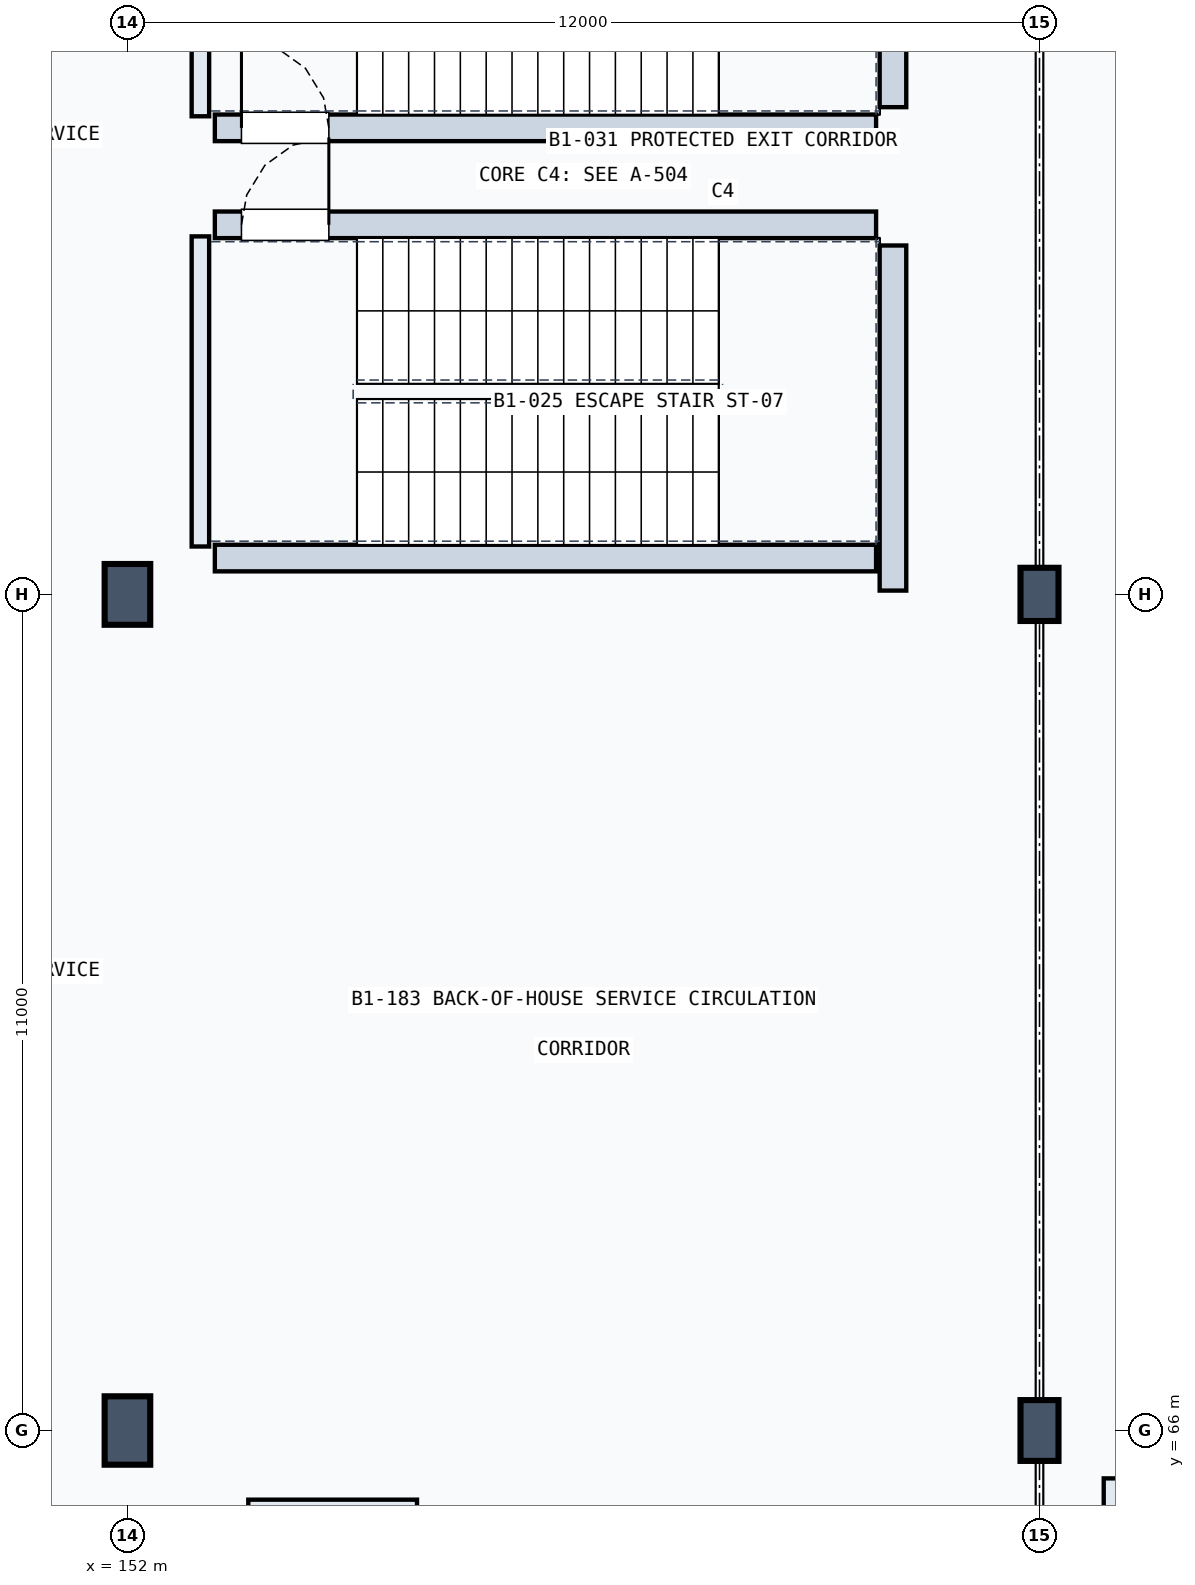
"""IFC4 building model, lengths in metres.
Left out: names, types, materials, properties, quantities, classifications, styles, units other than length and angle.
Written with IfcOpenShell. Run it as: python <this file> out.ifc"""

import sys

from ifc_helpers import new_model, si_unit, direction, frame, frame_2d, origin, origin_2d, place, context, subcontext, project, spatial, rectangle, extrude, element, fill, save


model = new_model("IFC4")
c1 = context("Model", 3, precision=1e-05, world=origin(), true_north=direction((0.0, 1.0)))
c2 = subcontext(c1, "Body", "Model", "MODEL_VIEW")
j1 = project(units=[si_unit("LENGTHUNIT", "METRE"), si_unit("PLANEANGLEUNIT", "RADIAN")], contexts=[c1])
p1 = place(None, origin())
s1 = spatial("IfcSite", under=j1, at=p1, CompositionType="ELEMENT")
p2 = place(p1, origin())
s2 = spatial("IfcBuilding", under=s1, at=p2, CompositionType="ELEMENT")
p3 = place(p2, frame((0.0, 0.0, -5.4)))
s3 = spatial("IfcBuildingStorey", under=s2, at=p3, CompositionType="ELEMENT", Elevation=-5.4)
p4 = place(p3, frame((152.0, 66.0, 0.0), z_axis=(0.0, 0.0, 1.0), x_axis=(1.0, 0.0, 0.0)))
e1 = element("IfcColumn", 1, at=p4, inside=s3, PredefinedType="COLUMN", context=c2, shape_type="SweptSolid", body=[
    extrude(rectangle(XDim=0.6, YDim=0.9, at=origin_2d()), origin(), (0.0, 0.0, 1.0), 5.4),
])
p5 = place(p3, frame((152.0, 77.0, 0.0), z_axis=(0.0, 0.0, 1.0), x_axis=(1.0, 0.0, 0.0)))
e2 = element("IfcColumn", 2, at=p5, inside=s3, PredefinedType="COLUMN", context=c2, shape_type="SweptSolid", body=[
    extrude(rectangle(XDim=0.6, YDim=0.8, at=origin_2d()), origin(), (0.0, 0.0, 1.0), 5.4),
])
p6 = place(p3, frame((164.0, 66.0, 0.0), z_axis=(0.0, 0.0, 1.0), x_axis=(1.0, 0.0, 0.0)))
e3 = element("IfcColumn", 3, at=p6, inside=s3, PredefinedType="COLUMN", context=c2, shape_type="SweptSolid", body=[
    extrude(rectangle(XDim=0.5, YDim=0.8, at=origin_2d()), origin(), (0.0, 0.0, 1.0), 5.4),
])
p7 = place(p3, frame((164.0, 77.0, 0.0), z_axis=(0.0, 0.0, 1.0), x_axis=(1.0, 0.0, 0.0)))
e4 = element("IfcColumn", 4, at=p7, inside=s3, PredefinedType="COLUMN", context=c2, shape_type="SweptSolid", body=[
    extrude(rectangle(XDim=0.5, YDim=0.7, at=origin_2d()), origin(), (0.0, 0.0, 1.0), 5.4),
])
p8 = place(p3, frame((152.96, 77.63, 0.0), z_axis=(0.0, 0.0, 1.0), x_axis=(0.0, 1.0, 0.0)))
e5 = element("IfcWall", 5, at=p8, inside=s3, PredefinedType="SOLIDWALL", context=c2, shape_type="SweptSolid", body=[
    extrude(rectangle(XDim=4.08, YDim=0.23, at=frame_2d((2.04, 0.0))), origin(), (0.0, 0.0, 1.0), 5.04),
])
p9 = place(p3, frame((162.072, 77.05, 0.0), z_axis=(0.0, 0.0, 1.0), x_axis=(0.0, 1.0, 0.0)))
e6 = element("IfcWall", 6, at=p9, inside=s3, PredefinedType="SOLIDWALL", context=c2, shape_type="SweptSolid", body=[
    extrude(rectangle(XDim=4.54, YDim=0.35, at=frame_2d((2.27, 0.0))), origin(), (0.0, 0.0, 1.0), 5.04),
])
p10 = place(p3, frame((153.15, 77.478, 0.0), z_axis=(0.0, 0.0, 1.0), x_axis=(1.0, 0.0, 0.0)))
e7 = element("IfcWall", 7, at=p10, inside=s3, PredefinedType="SOLIDWALL", context=c2, shape_type="SweptSolid", body=[
    extrude(rectangle(XDim=8.7, YDim=0.35, at=frame_2d((4.35, 0.0))), origin(), (0.0, 0.0, 1.0), 5.04),
])
p11 = place(p3, frame((153.15, 81.862, 0.0), z_axis=(0.0, 0.0, 1.0), x_axis=(1.0, 0.0, 0.0)))
e8 = element("IfcWall", 8, at=p11, inside=s3, PredefinedType="SOLIDWALL", context=c2, shape_type="SweptSolid", body=[
    extrude(rectangle(XDim=8.7, YDim=0.35, at=frame_2d((4.35, 0.0))), origin(), (0.0, 0.0, 1.0), 5.04),
])
p12 = place(p11, frame((0.35, 0.0, 0.0)))
e9 = element("IfcOpeningElement", 9, at=p12, cuts=e8, PredefinedType="OPENING", context=c2, shape_type="SweptSolid", body=[
    extrude(rectangle(XDim=1.15, YDim=2.2, at=frame_2d((0.575, 1.1))), frame((0.0, 0.185, 0.0), z_axis=(0.0, -1.0, 0.0), x_axis=(1.0, 0.0, 0.0)), (0.0, 0.0, 1.0), 0.37),
])
p13 = place(p3, frame((152.96, 83.29, 0.0), z_axis=(0.0, 0.0, 1.0), x_axis=(0.0, 1.0, 0.0)))
e10 = element("IfcWall", 10, at=p13, inside=s3, PredefinedType="SOLIDWALL", context=c2, shape_type="SweptSolid", body=[
    extrude(rectangle(XDim=4.08, YDim=0.23, at=frame_2d((2.04, 0.0))), origin(), (0.0, 0.0, 1.0), 5.04),
])
p14 = place(p3, frame((162.072, 83.41, 0.0), z_axis=(0.0, 0.0, 1.0), x_axis=(0.0, 1.0, 0.0)))
e11 = element("IfcWall", 11, at=p14, inside=s3, PredefinedType="SOLIDWALL", context=c2, shape_type="SweptSolid", body=[
    extrude(rectangle(XDim=3.84, YDim=0.35, at=frame_2d((1.92, 0.0))), origin(), (0.0, 0.0, 1.0), 5.04),
])
p15 = place(p3, frame((153.15, 83.138, 0.0), z_axis=(0.0, 0.0, 1.0), x_axis=(1.0, 0.0, 0.0)))
e12 = element("IfcWall", 12, at=p15, inside=s3, PredefinedType="SOLIDWALL", context=c2, shape_type="SweptSolid", body=[
    extrude(rectangle(XDim=8.7, YDim=0.35, at=frame_2d((4.35, 0.0))), origin(), (0.0, 0.0, 1.0), 5.04),
])
p16 = place(p15, frame((0.35, 0.0, 0.0)))
e13 = element("IfcOpeningElement", 13, at=p16, cuts=e12, PredefinedType="OPENING", context=c2, shape_type="SweptSolid", body=[
    extrude(rectangle(XDim=1.15, YDim=2.2, at=frame_2d((0.575, 1.1))), frame((0.0, 0.185, 0.0), z_axis=(0.0, -1.0, 0.0), x_axis=(1.0, 0.0, 0.0)), (0.0, 0.0, 1.0), 0.37),
])
p17 = place(p3, frame((153.59, 64.96, 0.0), z_axis=(0.0, 0.0, 1.0), x_axis=(1.0, 0.0, 0.0)))
e14 = element("IfcWall", 14, at=p17, inside=s3, PredefinedType="SOLIDWALL", context=c2, shape_type="SweptSolid", body=[
    extrude(rectangle(XDim=2.22, YDim=0.26, at=frame_2d((1.11, 0.0))), origin(), (0.0, 0.0, 1.0), 5.04),
])
p18 = place(p3, frame((164.96, 61.29, 0.0), z_axis=(0.0, 0.0, 1.0), x_axis=(0.0, 1.0, 0.0)))
e15 = element("IfcWall", 15, at=p18, inside=s3, PredefinedType="SOLIDWALL", context=c2, shape_type="SweptSolid", body=[
    extrude(rectangle(XDim=4.08, YDim=0.23, at=frame_2d((2.04, 0.0))), origin(), (0.0, 0.0, 1.0), 4.43),
])
p19 = place(p12, origin())
e16 = element("IfcDoor", 16, at=p19, inside=s3, OperationType="SINGLE_SWING_RIGHT", PredefinedType="DOOR", context=c2, shape_type="SweptSolid", body=[
    extrude(rectangle(XDim=1.15, YDim=2.2, at=frame_2d((0.575, 1.1))), frame((0.0, 0.025, 0.0), z_axis=(0.0, -1.0, 0.0), x_axis=(1.0, 0.0, 0.0)), (0.0, 0.0, 1.0), 0.05),
])
fill(e9, e16)
p20 = place(p16, origin())
e17 = element("IfcDoor", 17, at=p20, inside=s3, OperationType="SINGLE_SWING_LEFT", PredefinedType="DOOR", context=c2, shape_type="SweptSolid", body=[
    extrude(rectangle(XDim=1.15, YDim=2.2, at=frame_2d((0.575, 1.1))), frame((0.0, 0.025, 0.0), z_axis=(0.0, -1.0, 0.0), x_axis=(1.0, 0.0, 0.0)), (0.0, 0.0, 1.0), 0.05),
])
fill(e13, e17)
save(model, sys.argv[1])
